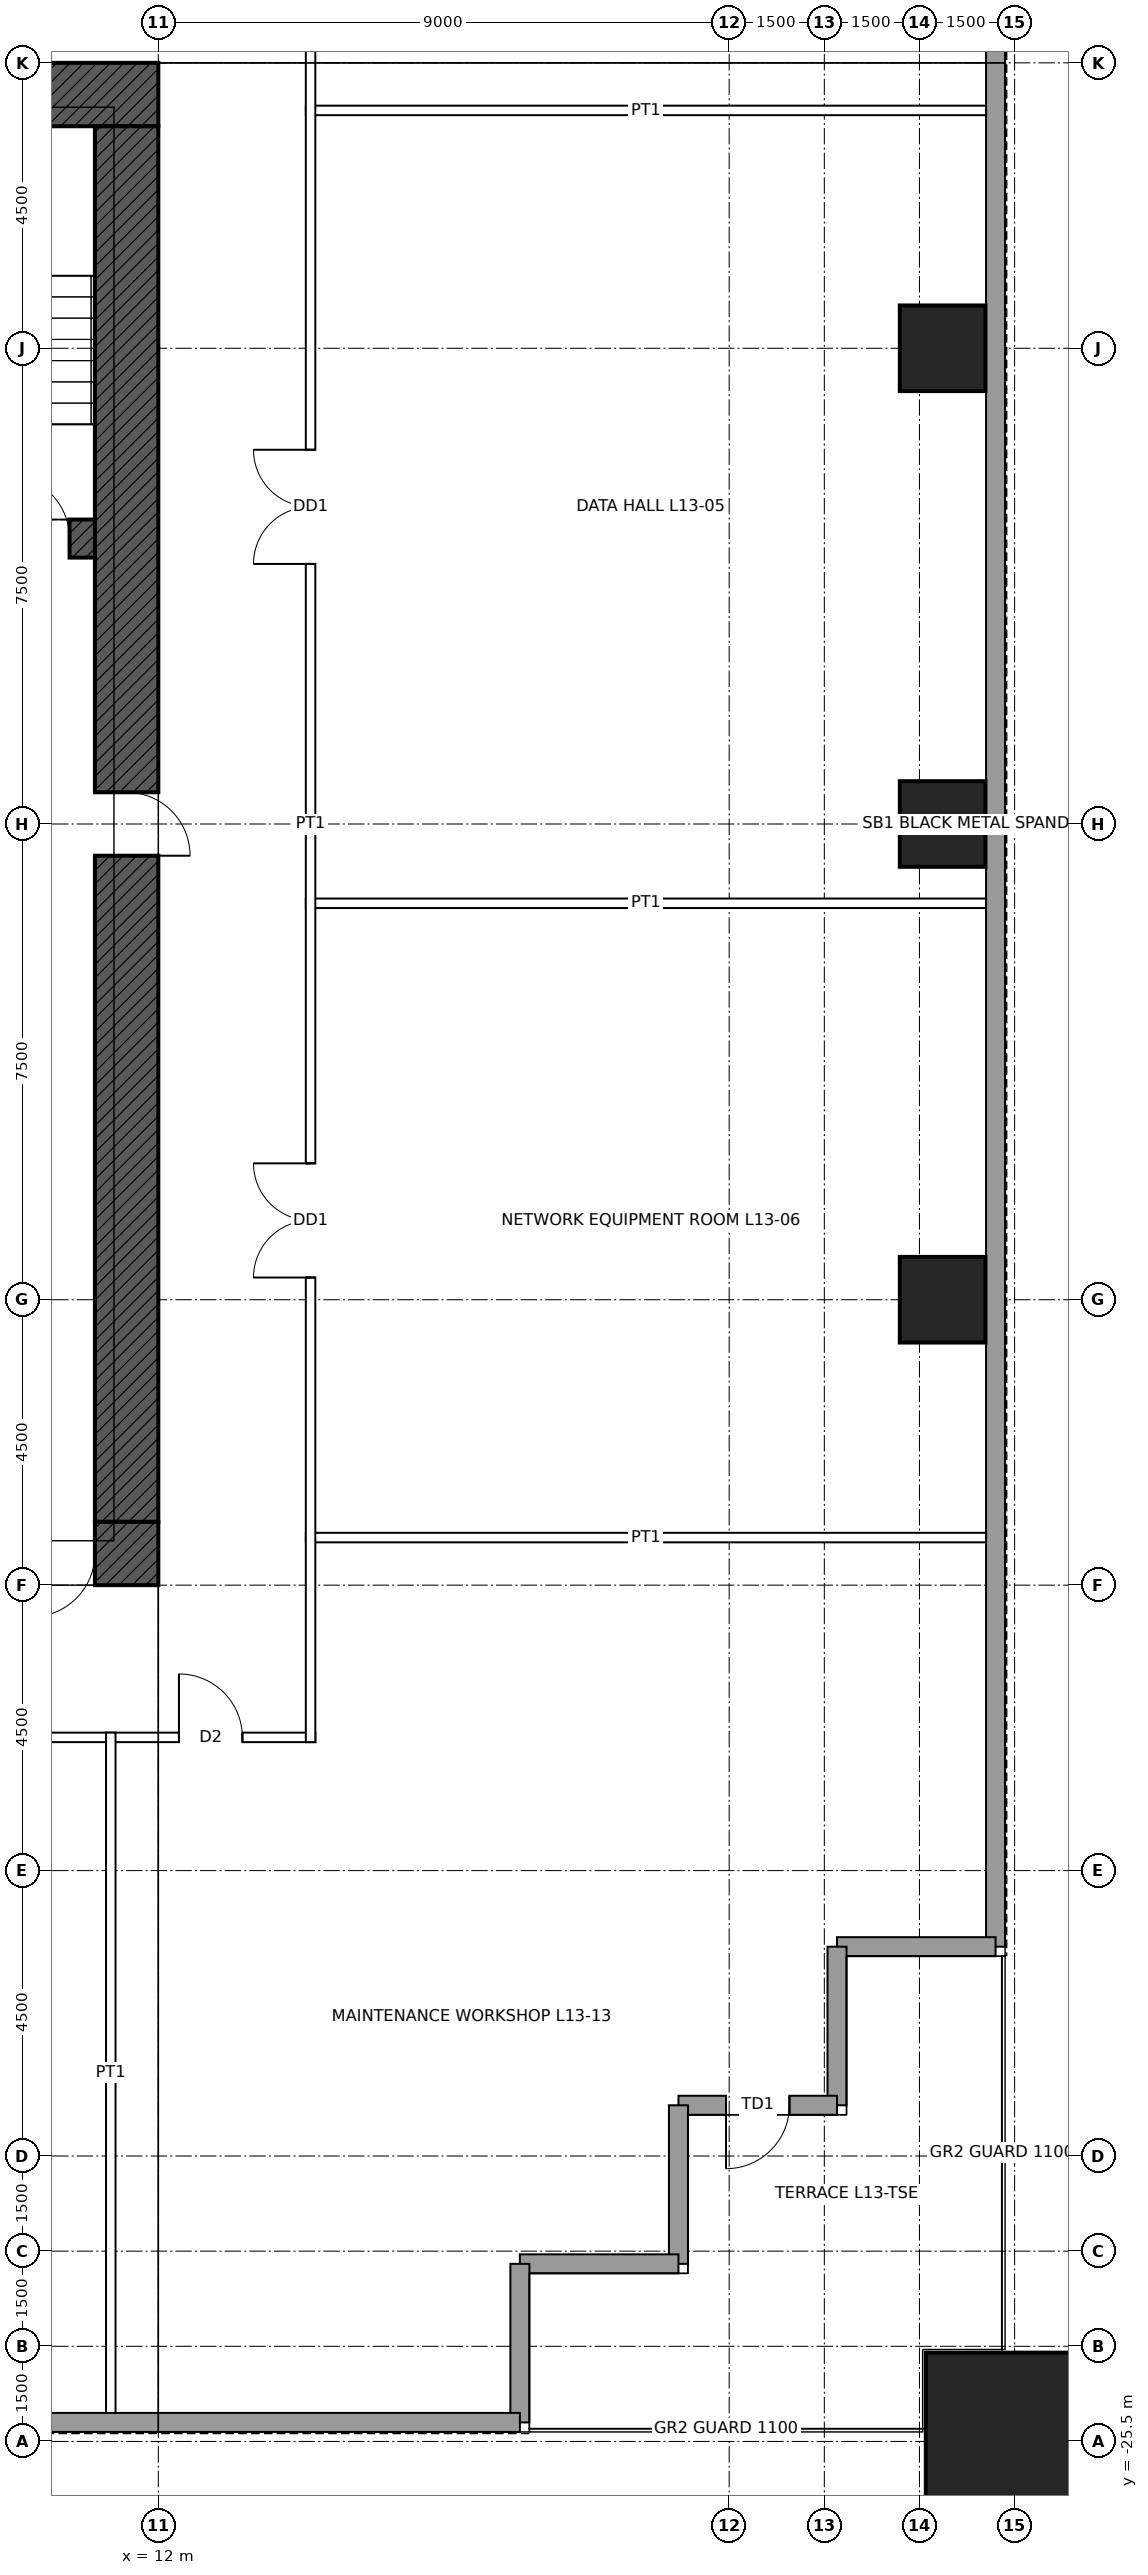
"""IFC4 building model, lengths in metres.
Left out: names, types, materials, properties, quantities, classifications, styles, units other than length and angle.
Written with IfcOpenShell. Run it as: python <this file> out.ifc"""

import sys

from ifc_helpers import new_model, si_unit, direction, frame, frame_2d, origin, origin_2d, place, context, subcontext, project, spatial, rectangle, hollow_rectangle, extrude, element, fill, save


model = new_model("IFC4")
c1 = context("Model", 3, precision=1e-05, world=origin(), true_north=direction((0.0, 1.0)))
c2 = subcontext(c1, "Body", "Model", "MODEL_VIEW")
j1 = project(units=[si_unit("LENGTHUNIT", "METRE"), si_unit("PLANEANGLEUNIT", "RADIAN")], contexts=[c1])
p1 = place(None, origin())
s1 = spatial("IfcSite", under=j1, at=p1, CompositionType="ELEMENT")
p2 = place(p1, origin())
s2 = spatial("IfcBuilding", under=s1, at=p2, CompositionType="ELEMENT")
p3 = place(p2, frame((0.0, 0.0, 68.4)))
s3 = spatial("IfcBuildingStorey", under=s2, at=p3, CompositionType="ELEMENT", Elevation=68.4)
p4 = place(p3, frame((25.5, -25.5, 0.0), z_axis=(0.0, 0.0, 1.0), x_axis=(1.0, 0.0, 0.0)))
e1 = element("IfcColumn", 1, at=p4, inside=s3, PredefinedType="COLUMN", context=c2, shape_type="SweptSolid", body=[
    extrude(hollow_rectangle(XDim=2.8, YDim=2.8, WallThickness=0.14, at=origin_2d()), origin(), (0.0, 0.0, 1.0), 5.0),
])
for number, where, z_axis, x_axis in (
    (2, (24.365, 7.5, 0.0), (0.0, 0.0, 1.0), (1.0, 0.0, 0.0)),
    (3, (24.365, 0.0, 0.0), (0.0, 0.0, 1.0), (1.0, 0.0, 0.0)),
    (4, (24.365, -7.5, 0.0), (0.0, 0.0, 1.0), (1.0, 0.0, 0.0)),
):
    element("IfcColumn", number, at=place(p3, frame(where, z_axis=z_axis, x_axis=x_axis)), inside=s3, PredefinedType="COLUMN", context=c2, shape_type="SweptSolid", body=[
        extrude(hollow_rectangle(XDim=1.35, YDim=1.35, WallThickness=0.085, at=origin_2d()), origin(), (0.0, 0.0, 1.0), 5.0),
    ])
p5 = place(p3, frame((-12.0, 11.5, 0.0), z_axis=(0.0, 0.0, 1.0), x_axis=(1.0, 0.0, 0.0)))
e5 = element("IfcWall", 5, at=p5, inside=s3, PredefinedType="SHEAR", context=c2, shape_type="SweptSolid", body=[
    extrude(rectangle(XDim=24.0, YDim=1.0, at=frame_2d((12.0, 0.0))), origin(), (0.0, 0.0, 1.0), 5.0),
])
p6 = place(p5, frame((6.25, 0.0, 0.0)))
e6 = element("IfcOpeningElement", 6, at=p6, cuts=e5, PredefinedType="OPENING", context=c2, shape_type="SweptSolid", body=[
    extrude(rectangle(XDim=1.0, YDim=2.4, at=frame_2d((0.5, 1.2))), frame((0.0, 0.51, 0.0), z_axis=(0.0, -1.0, 0.0), x_axis=(1.0, 0.0, 0.0)), (0.0, 0.0, 1.0), 1.02),
])
p7 = place(p5, frame((16.75, 0.0, 0.0)))
e7 = element("IfcOpeningElement", 7, at=p7, cuts=e5, PredefinedType="OPENING", context=c2, shape_type="SweptSolid", body=[
    extrude(rectangle(XDim=1.0, YDim=2.4, at=frame_2d((0.5, 1.2))), frame((0.0, 0.51, 0.0), z_axis=(0.0, -1.0, 0.0), x_axis=(1.0, 0.0, 0.0)), (0.0, 0.0, 1.0), 1.02),
])
p8 = place(p3, frame((12.0, -11.5, 0.0), z_axis=(0.0, 0.0, 1.0), x_axis=(-1.0, 0.0, 0.0)))
e8 = element("IfcWall", 8, at=p8, inside=s3, PredefinedType="SHEAR", context=c2, shape_type="SweptSolid", body=[
    extrude(rectangle(XDim=24.0, YDim=1.0, at=frame_2d((12.0, 0.0))), origin(), (0.0, 0.0, 1.0), 5.0),
])
p9 = place(p8, frame((11.5, 0.0, 0.0)))
e9 = element("IfcOpeningElement", 9, at=p9, cuts=e8, PredefinedType="OPENING", context=c2, shape_type="SweptSolid", body=[
    extrude(rectangle(XDim=1.0, YDim=2.1, at=frame_2d((0.5, 1.05))), frame((0.0, 0.51, 0.0), z_axis=(0.0, -1.0, 0.0), x_axis=(1.0, 0.0, 0.0)), (0.0, 0.0, 1.0), 1.02),
])
p10 = place(p8, frame((1.0, 0.0, 0.0)))
e10 = element("IfcOpeningElement", 10, at=p10, cuts=e8, PredefinedType="OPENING", context=c2, shape_type="SweptSolid", body=[
    extrude(rectangle(XDim=1.0, YDim=2.4, at=frame_2d((0.5, 1.2))), frame((0.0, 0.51, 0.0), z_axis=(0.0, -1.0, 0.0), x_axis=(1.0, 0.0, 0.0)), (0.0, 0.0, 1.0), 1.02),
])
p11 = place(p3, frame((11.5, 11.0, 0.0), z_axis=(0.0, 0.0, 1.0), x_axis=(0.0, -1.0, 0.0)))
e11 = element("IfcWall", 11, at=p11, inside=s3, PredefinedType="SHEAR", context=c2, shape_type="SweptSolid", body=[
    extrude(rectangle(XDim=22.0, YDim=1.0, at=frame_2d((11.0, 0.0))), origin(), (0.0, 0.0, 1.0), 5.0),
])
p12 = place(p11, frame((10.5, 0.0, 0.0)))
e12 = element("IfcOpeningElement", 12, at=p12, cuts=e11, PredefinedType="OPENING", context=c2, shape_type="SweptSolid", body=[
    extrude(rectangle(XDim=1.0, YDim=2.4, at=frame_2d((0.5, 1.2))), frame((0.0, 0.51, 0.0), z_axis=(0.0, -1.0, 0.0), x_axis=(1.0, 0.0, 0.0)), (0.0, 0.0, 1.0), 1.02),
])
p13 = place(p3, frame((-11.0, 4.5, 0.0), z_axis=(0.0, 0.0, 1.0), x_axis=(1.0, 0.0, 0.0)))
e13 = element("IfcWall", 13, at=p13, inside=s3, PredefinedType="SHEAR", context=c2, shape_type="SweptSolid", body=[
    extrude(rectangle(XDim=22.0, YDim=0.6, at=frame_2d((11.0, 0.0))), origin(), (0.0, 0.0, 1.0), 5.0),
])
p14 = place(p13, frame((0.4, 0.0, 0.0)))
e14 = element("IfcOpeningElement", 14, at=p14, cuts=e13, PredefinedType="OPENING", context=c2, shape_type="SweptSolid", body=[
    extrude(rectangle(XDim=1.0, YDim=2.1, at=frame_2d((0.5, 1.05))), frame((0.0, 0.31, 0.0), z_axis=(0.0, -1.0, 0.0), x_axis=(1.0, 0.0, 0.0)), (0.0, 0.0, 1.0), 0.62),
])
p15 = place(p13, frame((20.6, 0.0, 0.0)))
e15 = element("IfcOpeningElement", 15, at=p15, cuts=e13, PredefinedType="OPENING", context=c2, shape_type="SweptSolid", body=[
    extrude(rectangle(XDim=1.0, YDim=2.1, at=frame_2d((0.5, 1.05))), frame((0.0, 0.31, 0.0), z_axis=(0.0, -1.0, 0.0), x_axis=(1.0, 0.0, 0.0)), (0.0, 0.0, 1.0), 0.62),
])
p16 = place(p3, frame((25.2, 17.7, 0.0), z_axis=(0.0, 0.0, 1.0), x_axis=(0.0, -1.0, 0.0)))
e16 = element("IfcWall", 16, at=p16, inside=s3, PredefinedType="SOLIDWALL", context=c2, shape_type="SweptSolid", body=[
    extrude(rectangle(XDim=35.4, YDim=0.3, at=frame_2d((17.7, 0.0))), origin(), (0.0, 0.0, 1.0), 4.8),
])
for number, where, z_axis, x_axis in (
    (17, (25.2, -17.7, 0.0), (0.0, 0.0, 1.0), (-1.0, 0.0, 0.0)),
    (18, (22.7, -17.7, 0.0), (0.0, 0.0, 1.0), (0.0, -1.0, 0.0)),
):
    element("IfcWall", number, at=place(p3, frame(where, z_axis=z_axis, x_axis=x_axis)), inside=s3, PredefinedType="SOLIDWALL", context=c2, shape_type="SweptSolid", body=[
        extrude(rectangle(XDim=2.5, YDim=0.3, at=frame_2d((1.25, 0.0))), origin(), (0.0, 0.0, 1.0), 4.8),
    ])
p17 = place(p3, frame((22.7, -20.2, 0.0), z_axis=(0.0, 0.0, 1.0), x_axis=(-1.0, 0.0, 0.0)))
e19 = element("IfcWall", 19, at=p17, inside=s3, PredefinedType="SOLIDWALL", context=c2, shape_type="SweptSolid", body=[
    extrude(rectangle(XDim=2.5, YDim=0.3, at=frame_2d((1.25, 0.0))), origin(), (0.0, 0.0, 1.0), 4.8),
])
p18 = place(p17, frame((0.75, 0.0, 0.0)))
e20 = element("IfcOpeningElement", 20, at=p18, cuts=e19, PredefinedType="OPENING", context=c2, shape_type="SweptSolid", body=[
    extrude(rectangle(XDim=1.0, YDim=2.4, at=frame_2d((0.5, 1.2))), frame((0.0, 0.16, 0.0), z_axis=(0.0, -1.0, 0.0), x_axis=(1.0, 0.0, 0.0)), (0.0, 0.0, 1.0), 0.32),
])
for number, where, z_axis, x_axis in (
    (21, (20.2, -20.2, 0.0), (0.0, 0.0, 1.0), (0.0, -1.0, 0.0)),
    (22, (20.2, -22.7, 0.0), (0.0, 0.0, 1.0), (-1.0, 0.0, 0.0)),
    (23, (17.7, -22.7, 0.0), (0.0, 0.0, 1.0), (0.0, -1.0, 0.0)),
):
    element("IfcWall", number, at=place(p3, frame(where, z_axis=z_axis, x_axis=x_axis)), inside=s3, PredefinedType="SOLIDWALL", context=c2, shape_type="SweptSolid", body=[
        extrude(rectangle(XDim=2.5, YDim=0.3, at=frame_2d((1.25, 0.0))), origin(), (0.0, 0.0, 1.0), 4.8),
    ])
p19 = place(p3, frame((17.7, -25.2, 0.0), z_axis=(0.0, 0.0, 1.0), x_axis=(-1.0, 0.0, 0.0)))
e24 = element("IfcWall", 24, at=p19, inside=s3, PredefinedType="SOLIDWALL", context=c2, shape_type="SweptSolid", body=[
    extrude(rectangle(XDim=35.4, YDim=0.3, at=frame_2d((17.7, 0.0))), origin(), (0.0, 0.0, 1.0), 4.8),
])
p20 = place(p3, frame((-14.475, -14.4, 0.0), z_axis=(0.0, 0.0, 1.0), x_axis=(1.0, 0.0, 0.0)))
e25 = element("IfcWall", 25, at=p20, inside=s3, PredefinedType="PARTITIONING", context=c2, shape_type="SweptSolid", body=[
    extrude(rectangle(XDim=28.95, YDim=0.15, at=frame_2d((14.475, 0.0))), origin(), (0.0, 0.0, 1.0), 4.8),
])
p21 = place(p20, frame((19.825, 0.0, 0.0)))
e26 = element("IfcOpeningElement", 26, at=p21, cuts=e25, PredefinedType="OPENING", context=c2, shape_type="SweptSolid", body=[
    extrude(rectangle(XDim=1.8, YDim=2.4, at=frame_2d((0.9, 1.2))), frame((0.0, 0.085, 0.0), z_axis=(0.0, -1.0, 0.0), x_axis=(1.0, 0.0, 0.0)), (0.0, 0.0, 1.0), 0.17),
])
p22 = place(p20, frame((8.975, 0.0, 0.0)))
e27 = element("IfcOpeningElement", 27, at=p22, cuts=e25, PredefinedType="OPENING", context=c2, shape_type="SweptSolid", body=[
    extrude(rectangle(XDim=1.0, YDim=2.1, at=frame_2d((0.5, 1.05))), frame((0.0, 0.085, 0.0), z_axis=(0.0, -1.0, 0.0), x_axis=(1.0, 0.0, 0.0)), (0.0, 0.0, 1.0), 0.17),
])
p23 = place(p20, frame((26.8, 0.0, 0.0)))
e28 = element("IfcOpeningElement", 28, at=p23, cuts=e25, PredefinedType="OPENING", context=c2, shape_type="SweptSolid", body=[
    extrude(rectangle(XDim=1.0, YDim=2.1, at=frame_2d((0.5, 1.05))), frame((0.0, 0.085, 0.0), z_axis=(0.0, -1.0, 0.0), x_axis=(1.0, 0.0, 0.0)), (0.0, 0.0, 1.0), 0.17),
])
p24 = place(p20, frame((1.15, 0.0, 0.0)))
e29 = element("IfcOpeningElement", 29, at=p24, cuts=e25, PredefinedType="OPENING", context=c2, shape_type="SweptSolid", body=[
    extrude(rectangle(XDim=1.0, YDim=2.1, at=frame_2d((0.5, 1.05))), frame((0.0, 0.085, 0.0), z_axis=(0.0, -1.0, 0.0), x_axis=(1.0, 0.0, 0.0)), (0.0, 0.0, 1.0), 0.17),
])
p25 = place(p3, frame((14.325, -11.25, 0.0), z_axis=(0.0, 0.0, 1.0), x_axis=(1.0, 0.0, 0.0)))
e30 = element("IfcWall", 30, at=p25, inside=s3, PredefinedType="PARTITIONING", context=c2, shape_type="SweptSolid", body=[
    extrude(rectangle(XDim=10.725, YDim=0.15, at=frame_2d((5.363, 0.0))), origin(), (0.0, 0.0, 1.0), 3.853),
])
p26 = place(p3, frame((14.325, -1.25, 0.0), z_axis=(0.0, 0.0, 1.0), x_axis=(1.0, 0.0, 0.0)))
e31 = element("IfcWall", 31, at=p26, inside=s3, PredefinedType="PARTITIONING", context=c2, shape_type="SweptSolid", body=[
    extrude(rectangle(XDim=10.725, YDim=0.15, at=frame_2d((5.363, 0.0))), origin(), (0.0, 0.0, 1.0), 4.8),
])
for number, where, z_axis, x_axis in (
    (32, (14.325, 11.25, 0.0), (0.0, 0.0, 1.0), (1.0, 0.0, 0.0)),
    (33, (11.25, -25.05, 0.0), (0.0, 0.0, 1.0), (0.0, 1.0, 0.0)),
):
    element("IfcWall", number, at=place(p3, frame(where, z_axis=z_axis, x_axis=x_axis)), inside=s3, PredefinedType="PARTITIONING", context=c2, shape_type="SweptSolid", body=[
        extrude(rectangle(XDim=10.725, YDim=0.15, at=frame_2d((5.363, 0.0))), origin(), (0.0, 0.0, 1.0), 3.853),
    ])
p27 = place(p3, frame((14.4, -14.475, 0.0), z_axis=(0.0, 0.0, 1.0), x_axis=(0.0, 1.0, 0.0)))
e34 = element("IfcWall", 34, at=p27, inside=s3, PredefinedType="PARTITIONING", context=c2, shape_type="SweptSolid", body=[
    extrude(rectangle(XDim=28.95, YDim=0.15, at=frame_2d((14.475, 0.0))), origin(), (0.0, 0.0, 1.0), 4.8),
])
p28 = place(p27, frame((18.575, 0.0, 0.0)))
e35 = element("IfcOpeningElement", 35, at=p28, cuts=e34, PredefinedType="OPENING", context=c2, shape_type="SweptSolid", body=[
    extrude(rectangle(XDim=1.8, YDim=2.4, at=frame_2d((0.9, 1.2))), frame((0.0, 0.085, 0.0), z_axis=(0.0, -1.0, 0.0), x_axis=(1.0, 0.0, 0.0)), (0.0, 0.0, 1.0), 0.17),
])
p29 = place(p27, frame((7.325, 0.0, 0.0)))
e36 = element("IfcOpeningElement", 36, at=p29, cuts=e34, PredefinedType="OPENING", context=c2, shape_type="SweptSolid", body=[
    extrude(rectangle(XDim=1.8, YDim=2.4, at=frame_2d((0.9, 1.2))), frame((0.0, 0.085, 0.0), z_axis=(0.0, -1.0, 0.0), x_axis=(1.0, 0.0, 0.0)), (0.0, 0.0, 1.0), 0.17),
])
p30 = place(p18, origin())
e37 = element("IfcDoor", 37, at=p30, inside=s3, OperationType="SINGLE_SWING_RIGHT", PredefinedType="DOOR", context=c2, shape_type="SweptSolid", body=[
    extrude(rectangle(XDim=1.0, YDim=2.4, at=frame_2d((0.5, 1.2))), frame((0.0, 0.025, 0.0), z_axis=(0.0, -1.0, 0.0), x_axis=(1.0, 0.0, 0.0)), (0.0, 0.0, 1.0), 0.05),
])
fill(e20, e37)
p31 = place(p15, origin())
e38 = element("IfcDoor", 38, at=p31, inside=s3, OperationType="SINGLE_SWING_LEFT", PredefinedType="DOOR", context=c2, shape_type="SweptSolid", body=[
    extrude(rectangle(XDim=1.0, YDim=2.1, at=frame_2d((0.5, 1.05))), frame((0.0, 0.025, 0.0), z_axis=(0.0, -1.0, 0.0), x_axis=(1.0, 0.0, 0.0)), (0.0, 0.0, 1.0), 0.05),
])
fill(e15, e38)
p32 = place(p12, origin())
e39 = element("IfcDoor", 39, at=p32, inside=s3, OperationType="SINGLE_SWING_RIGHT", PredefinedType="DOOR", context=c2, shape_type="SweptSolid", body=[
    extrude(rectangle(XDim=1.0, YDim=2.4, at=frame_2d((0.5, 1.2))), frame((0.0, 0.485, 0.0), z_axis=(0.0, -1.0, 0.0), x_axis=(1.0, 0.0, 0.0)), (0.0, 0.0, 1.0), 0.05),
])
fill(e12, e39)
p33 = place(p10, origin())
e40 = element("IfcDoor", 40, at=p33, inside=s3, OperationType="SINGLE_SWING_RIGHT", PredefinedType="DOOR", context=c2, shape_type="SweptSolid", body=[
    extrude(rectangle(XDim=1.0, YDim=2.4, at=frame_2d((0.5, 1.2))), frame((0.0, 0.485, 0.0), z_axis=(0.0, -1.0, 0.0), x_axis=(1.0, 0.0, 0.0)), (0.0, 0.0, 1.0), 0.05),
])
fill(e10, e40)
p34 = place(p28, origin())
e41 = element("IfcDoor", 41, at=p34, inside=s3, OperationType="DOUBLE_DOOR_SINGLE_SWING", PredefinedType="DOOR", context=c2, shape_type="SweptSolid", body=[
    extrude(rectangle(XDim=1.8, YDim=2.4, at=frame_2d((0.9, 1.2))), frame((0.0, 0.025, 0.0), z_axis=(0.0, -1.0, 0.0), x_axis=(1.0, 0.0, 0.0)), (0.0, 0.0, 1.0), 0.05),
])
fill(e35, e41)
p35 = place(p29, origin())
e42 = element("IfcDoor", 42, at=p35, inside=s3, OperationType="DOUBLE_DOOR_SINGLE_SWING", PredefinedType="DOOR", context=c2, shape_type="SweptSolid", body=[
    extrude(rectangle(XDim=1.8, YDim=2.4, at=frame_2d((0.9, 1.2))), frame((0.0, 0.025, 0.0), z_axis=(0.0, -1.0, 0.0), x_axis=(1.0, 0.0, 0.0)), (0.0, 0.0, 1.0), 0.05),
])
fill(e36, e42)
p36 = place(p23, origin())
e43 = element("IfcDoor", 43, at=p36, inside=s3, OperationType="SINGLE_SWING_LEFT", PredefinedType="DOOR", context=c2, shape_type="SweptSolid", body=[
    extrude(rectangle(XDim=1.0, YDim=2.1, at=frame_2d((0.5, 1.05))), frame((0.0, 0.025, 0.0), z_axis=(0.0, -1.0, 0.0), x_axis=(1.0, 0.0, 0.0)), (0.0, 0.0, 1.0), 0.05),
])
fill(e28, e43)
save(model, sys.argv[1])
